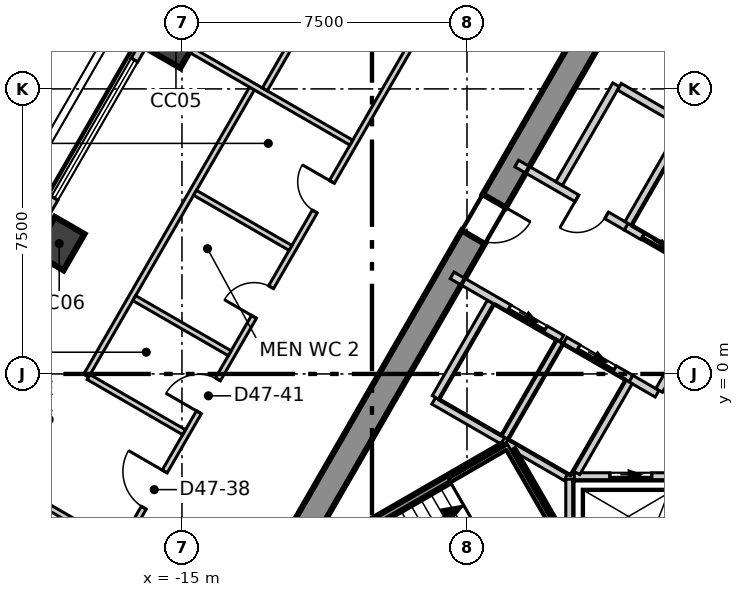
"""IFC4 building model, lengths in metres.
Left out: names, types, materials, properties, quantities, classifications, styles, units other than length and angle.
Written with IfcOpenShell. Run it as: python <this file> out.ifc"""

import sys

from ifc_helpers import new_model, si_unit, direction, frame, frame_2d, origin, origin_2d, place, context, subcontext, project, spatial, polyline, rectangle, outline, extrude, element, fill, save


model = new_model("IFC4")
c1 = context("Model", 3, precision=1e-05, world=origin(), true_north=direction((0.0, 1.0)))
c2 = subcontext(c1, "Body", "Model", "MODEL_VIEW")
j1 = project(units=[si_unit("LENGTHUNIT", "METRE"), si_unit("PLANEANGLEUNIT", "RADIAN")], contexts=[c1])
p1 = place(None, origin())
s1 = spatial("IfcSite", under=j1, at=p1, CompositionType="ELEMENT")
p2 = place(p1, origin())
s2 = spatial("IfcBuilding", under=s1, at=p2, CompositionType="ELEMENT")
p3 = place(p2, frame((0.0, 0.0, 203.3)))
s3 = spatial("IfcBuildingStorey", under=s2, at=p3, CompositionType="ELEMENT", Elevation=203.3)
p4 = place(p3, frame((-1.703, 13.35, -0.3), z_axis=(0.0, 0.0, 1.0), x_axis=(-0.500011533395, -0.866018744874, 0.0)))
e1 = element("IfcWall", 1, at=p4, inside=s3, PredefinedType="SHEAR", context=c2, shape_type="SweptSolid", body=[
    extrude(outline(polyline([(-0.202, -0.35), (1.782, -0.35), (3.766, -0.35), (5.75, -0.35), (7.734, -0.35), (9.718, -0.35), (11.702, -0.35), (13.686, -0.35), (15.67, -0.35), (17.654, -0.35), (19.638, -0.35), (21.622, -0.35), (21.218, 0.35), (19.307, 0.35), (17.397, 0.35), (15.486, 0.35), (13.576, 0.35), (11.665, 0.35), (9.755, 0.35), (7.844, 0.35), (5.934, 0.35), (4.023, 0.35), (2.113, 0.35), (0.202, 0.35), (-0.202, -0.35)])), origin(), (0.0, 0.0, 1.0), 4.0),
])
p5 = place(p4, frame((10.16, 0.0, 0.3)))
e2 = element("IfcOpeningElement", 2, at=p5, cuts=e1, PredefinedType="OPENING", context=c2, shape_type="SweptSolid", body=[
    extrude(rectangle(XDim=1.1, YDim=2.1, at=frame_2d((0.55, 1.05))), frame((0.0, 0.36, 0.0), z_axis=(0.0, -1.0, 0.0), x_axis=(1.0, 0.0, 0.0)), (0.0, 0.0, 1.0), 0.72),
])
p6 = place(p4, frame((4.055, 0.0, 0.3)))
e3 = element("IfcOpeningElement", 3, at=p6, cuts=e1, PredefinedType="OPENING", context=c2, shape_type="SweptSolid", body=[
    extrude(rectangle(XDim=0.9, YDim=2.1, at=frame_2d((0.45, 1.05))), frame((0.0, 0.36, 0.0), z_axis=(0.0, -1.0, 0.0), x_axis=(1.0, 0.0, 0.0)), (0.0, 0.0, 1.0), 0.72),
])
for number, where, z_axis, x_axis in (
    (4, (-15.158, 8.751, -0.3), (0.0, 0.0, 1.0), (0.5, 0.866, 0.0)),
    (5, (-18.23, 3.43, -0.3), (0.0, 0.0, 1.0), (0.5, 0.866, 0.0)),
):
    element("IfcColumn", number, at=place(p3, frame(where, z_axis=z_axis, x_axis=x_axis)), inside=s3, PredefinedType="COLUMN", context=c2, shape_type="SweptSolid", body=[
        extrude(rectangle(XDim=1.1, YDim=0.9, at=origin_2d()), origin(), (0.0, 0.0, 1.0), 4.0),
    ])
p7 = place(p3, frame((-2.824, 31.513, 0.0), z_axis=(0.0, 0.0, 1.0), x_axis=(-0.500012324412, -0.866018288165, 0.0)))
e6 = element("IfcWall", 6, at=p7, inside=s3, PredefinedType="ELEMENTEDWALL", context=c2, shape_type="SweptSolid", body=[
    extrude(rectangle(XDim=51.739, YDim=0.2, at=frame_2d((25.87, 0.0))), origin(), (0.0, 0.0, 1.0), 3.7),
])
p8 = place(p7, frame((2.275, 0.0, 0.9)))
e7 = element("IfcOpeningElement", 7, at=p8, cuts=e6, PredefinedType="OPENING", context=c2, shape_type="SweptSolid", body=[
    extrude(rectangle(XDim=4.2, YDim=2.5, at=frame_2d((2.1, 1.25))), frame((0.0, 0.11, 0.0), z_axis=(0.0, -1.0, 0.0), x_axis=(1.0, 0.0, 0.0)), (0.0, 0.0, 1.0), 0.22),
])
p9 = place(p7, frame((8.419, 0.0, 0.9)))
e8 = element("IfcOpeningElement", 8, at=p9, cuts=e6, PredefinedType="OPENING", context=c2, shape_type="SweptSolid", body=[
    extrude(rectangle(XDim=4.2, YDim=2.5, at=frame_2d((2.1, 1.25))), frame((0.0, 0.11, 0.0), z_axis=(0.0, -1.0, 0.0), x_axis=(1.0, 0.0, 0.0)), (0.0, 0.0, 1.0), 0.22),
])
p10 = place(p7, frame((14.563, 0.0, 0.9)))
e9 = element("IfcOpeningElement", 9, at=p10, cuts=e6, PredefinedType="OPENING", context=c2, shape_type="SweptSolid", body=[
    extrude(rectangle(XDim=4.2, YDim=2.5, at=frame_2d((2.1, 1.25))), frame((0.0, 0.11, 0.0), z_axis=(0.0, -1.0, 0.0), x_axis=(1.0, 0.0, 0.0)), (0.0, 0.0, 1.0), 0.22),
])
p11 = place(p7, frame((20.707, 0.0, 0.9)))
e10 = element("IfcOpeningElement", 10, at=p11, cuts=e6, PredefinedType="OPENING", context=c2, shape_type="SweptSolid", body=[
    extrude(rectangle(XDim=4.2, YDim=2.5, at=frame_2d((2.1, 1.25))), frame((0.0, 0.11, 0.0), z_axis=(0.0, -1.0, 0.0), x_axis=(1.0, 0.0, 0.0)), (0.0, 0.0, 1.0), 0.22),
])
p12 = place(p7, frame((26.851, 0.0, 0.9)))
e11 = element("IfcOpeningElement", 11, at=p12, cuts=e6, PredefinedType="OPENING", context=c2, shape_type="SweptSolid", body=[
    extrude(rectangle(XDim=4.2, YDim=2.5, at=frame_2d((2.1, 1.25))), frame((0.0, 0.11, 0.0), z_axis=(0.0, -1.0, 0.0), x_axis=(1.0, 0.0, 0.0)), (0.0, 0.0, 1.0), 0.22),
])
p13 = place(p7, frame((32.995, 0.0, 0.9)))
e12 = element("IfcOpeningElement", 12, at=p13, cuts=e6, PredefinedType="OPENING", context=c2, shape_type="SweptSolid", body=[
    extrude(rectangle(XDim=4.2, YDim=2.5, at=frame_2d((2.1, 1.25))), frame((0.0, 0.11, 0.0), z_axis=(0.0, -1.0, 0.0), x_axis=(1.0, 0.0, 0.0)), (0.0, 0.0, 1.0), 0.22),
])
p14 = place(p7, frame((39.14, 0.0, 0.9)))
e13 = element("IfcOpeningElement", 13, at=p14, cuts=e6, PredefinedType="OPENING", context=c2, shape_type="SweptSolid", body=[
    extrude(rectangle(XDim=4.2, YDim=2.5, at=frame_2d((2.1, 1.25))), frame((0.0, 0.11, 0.0), z_axis=(0.0, -1.0, 0.0), x_axis=(1.0, 0.0, 0.0)), (0.0, 0.0, 1.0), 0.22),
])
p15 = place(p7, frame((45.284, 0.0, 0.9)))
e14 = element("IfcOpeningElement", 14, at=p15, cuts=e6, PredefinedType="OPENING", context=c2, shape_type="SweptSolid", body=[
    extrude(rectangle(XDim=4.2, YDim=2.5, at=frame_2d((2.1, 1.25))), frame((0.0, 0.11, 0.0), z_axis=(0.0, -1.0, 0.0), x_axis=(1.0, 0.0, 0.0)), (0.0, 0.0, 1.0), 0.22),
])
p16 = place(p3, frame((-21.839, -1.581, 0.0), z_axis=(0.0, 0.0, 1.0), x_axis=(0.866034527326, -0.49998419723, 0.0)))
e15 = element("IfcWall", 15, at=p16, inside=s3, PredefinedType="PARTITIONING", context=c2, shape_type="SweptSolid", body=[
    extrude(rectangle(XDim=5.948, YDim=0.15, at=frame_2d((2.974, 0.0))), origin(), (0.0, 0.0, 1.0), 3.7),
])
p17 = place(p3, frame((-20.883, -11.97, 0.0), z_axis=(0.0, 0.0, 1.0), x_axis=(0.500006150555, 0.866021852731, 0.0)))
e16 = element("IfcWall", 16, at=p17, inside=s3, PredefinedType="PARTITIONING", context=c2, shape_type="SweptSolid", body=[
    extrude(rectangle(XDim=41.766, YDim=0.15, at=frame_2d((20.883, 0.0))), origin(), (0.0, 0.0, 1.0), 3.7),
])
p18 = place(p17, frame((36.916, 0.0, 0.0)))
e17 = element("IfcOpeningElement", 17, at=p18, cuts=e16, PredefinedType="OPENING", context=c2, shape_type="SweptSolid", body=[
    extrude(rectangle(XDim=1.1, YDim=2.1, at=frame_2d((0.55, 1.05))), frame((0.0, 0.085, 0.0), z_axis=(0.0, -1.0, 0.0), x_axis=(1.0, 0.0, 0.0)), (0.0, 0.0, 1.0), 0.17),
])
p19 = place(p17, frame((26.446, 0.0, 0.0)))
e18 = element("IfcOpeningElement", 18, at=p19, cuts=e16, PredefinedType="OPENING", context=c2, shape_type="SweptSolid", body=[
    extrude(rectangle(XDim=1.1, YDim=2.1, at=frame_2d((0.55, 1.05))), frame((0.0, 0.085, 0.0), z_axis=(0.0, -1.0, 0.0), x_axis=(1.0, 0.0, 0.0)), (0.0, 0.0, 1.0), 0.17),
])
p20 = place(p17, frame((9.757, 0.0, 0.0)))
e19 = element("IfcOpeningElement", 19, at=p20, cuts=e16, PredefinedType="OPENING", context=c2, shape_type="SweptSolid", body=[
    extrude(rectangle(XDim=1.1, YDim=2.1, at=frame_2d((0.55, 1.05))), frame((0.0, 0.085, 0.0), z_axis=(0.0, -1.0, 0.0), x_axis=(1.0, 0.0, 0.0)), (0.0, 0.0, 1.0), 0.17),
])
p21 = place(p17, frame((18.757, 0.0, 0.0)))
e20 = element("IfcOpeningElement", 20, at=p21, cuts=e16, PredefinedType="OPENING", context=c2, shape_type="SweptSolid", body=[
    extrude(rectangle(XDim=0.9, YDim=2.1, at=frame_2d((0.45, 1.05))), frame((0.0, 0.085, 0.0), z_axis=(0.0, -1.0, 0.0), x_axis=(1.0, 0.0, 0.0)), (0.0, 0.0, 1.0), 0.17),
])
p22 = place(p17, frame((15.557, 0.0, 0.0)))
e21 = element("IfcOpeningElement", 21, at=p22, cuts=e16, PredefinedType="OPENING", context=c2, shape_type="SweptSolid", body=[
    extrude(rectangle(XDim=0.9, YDim=2.1, at=frame_2d((0.45, 1.05))), frame((0.0, 0.085, 0.0), z_axis=(0.0, -1.0, 0.0), x_axis=(1.0, 0.0, 0.0)), (0.0, 0.0, 1.0), 0.17),
])
p23 = place(p17, frame((12.657, 0.0, 0.0)))
e22 = element("IfcOpeningElement", 22, at=p23, cuts=e16, PredefinedType="OPENING", context=c2, shape_type="SweptSolid", body=[
    extrude(rectangle(XDim=1.0, YDim=2.1, at=frame_2d((0.5, 1.05))), frame((0.0, 0.085, 0.0), z_axis=(0.0, -1.0, 0.0), x_axis=(1.0, 0.0, 0.0)), (0.0, 0.0, 1.0), 0.17),
])
p24 = place(p17, frame((3.669, 0.0, 0.0)))
e23 = element("IfcOpeningElement", 23, at=p24, cuts=e16, PredefinedType="OPENING", context=c2, shape_type="SweptSolid", body=[
    extrude(rectangle(XDim=1.1, YDim=2.1, at=frame_2d((0.55, 1.05))), frame((0.0, 0.085, 0.0), z_axis=(0.0, -1.0, 0.0), x_axis=(1.0, 0.0, 0.0)), (0.0, 0.0, 1.0), 0.17),
])
p25 = place(p3, frame((-17.521, -0.046, 0.0), z_axis=(0.0, 0.0, 1.0), x_axis=(0.499970334739, 0.866042530354, 0.0)))
e24 = element("IfcWall", 24, at=p25, inside=s3, PredefinedType="PARTITIONING", context=c2, shape_type="SweptSolid", body=[
    extrude(rectangle(XDim=8.725, YDim=0.15, at=frame_2d((4.362, 0.0))), origin(), (0.0, 0.0, 1.0), 3.7),
])
p26 = place(p3, frame((-17.456, -0.083, 0.0), z_axis=(0.0, 0.0, 1.0), x_axis=(0.865929066901, -0.500166823267, 0.0)))
e25 = element("IfcWall", 25, at=p26, inside=s3, PredefinedType="PARTITIONING", context=c2, shape_type="SweptSolid", body=[
    extrude(rectangle(XDim=2.901, YDim=0.15, at=frame_2d((1.45, 0.0))), origin(), (0.0, 0.0, 1.0), 3.7),
])
p27 = place(p3, frame((-16.256, 1.995, 0.0), z_axis=(0.0, 0.0, 1.0), x_axis=(0.866059450854, -0.499941024108, 0.0)))
e26 = element("IfcWall", 26, at=p27, inside=s3, PredefinedType="PARTITIONING", context=c2, shape_type="SweptSolid", body=[
    extrude(rectangle(XDim=2.901, YDim=0.15, at=frame_2d((1.45, 0.0))), origin(), (0.0, 0.0, 1.0), 3.7),
])
p28 = place(p3, frame((-15.695, 9.061, 0.0), z_axis=(0.0, 0.0, 1.0), x_axis=(0.866016753976, -0.500014981608, 0.0)))
e27 = element("IfcWall", 27, at=p28, inside=s3, PredefinedType="PARTITIONING", context=c2, shape_type="SweptSolid", body=[
    extrude(rectangle(XDim=5.948, YDim=0.15, at=frame_2d((2.974, 0.0))), origin(), (0.0, 0.0, 1.0), 3.2),
])
p29 = place(p3, frame((-14.656, 4.766, 0.0), z_axis=(0.0, 0.0, 1.0), x_axis=(0.866038412228, -0.499977468037, 0.0)))
e28 = element("IfcWall", 28, at=p29, inside=s3, PredefinedType="PARTITIONING", context=c2, shape_type="SweptSolid", body=[
    extrude(rectangle(XDim=2.901, YDim=0.15, at=frame_2d((1.45, 0.0))), origin(), (0.0, 0.0, 1.0), 3.7),
])
p30 = place(p3, frame((-12.82, 7.488, 0.0), z_axis=(0.0, 0.0, 1.0), x_axis=(0.500060781096, 0.865990308958, 0.0)))
e29 = element("IfcWall", 29, at=p30, inside=s3, PredefinedType="PARTITIONING", context=c2, shape_type="SweptSolid", body=[
    extrude(rectangle(XDim=12.139, YDim=0.15, at=frame_2d((6.069, 0.0))), origin(), (0.0, 0.0, 1.0), 3.7),
])
p31 = place(p30, frame((5.564, 0.0, 0.0)))
e30 = element("IfcOpeningElement", 30, at=p31, cuts=e29, PredefinedType="OPENING", context=c2, shape_type="SweptSolid", body=[
    extrude(rectangle(XDim=1.0, YDim=2.1, at=frame_2d((0.5, 1.05))), frame((0.0, 0.085, 0.0), z_axis=(0.0, -1.0, 0.0), x_axis=(1.0, 0.0, 0.0)), (0.0, 0.0, 1.0), 0.17),
])
p32 = place(p3, frame((-8.376, -0.707, 0.0), z_axis=(0.0, 0.0, 1.0), x_axis=(0.866067520717, -0.499927044236, 0.0)))
e31 = element("IfcWall", 31, at=p32, inside=s3, PredefinedType="SOLIDWALL", context=c2, shape_type="SweptSolid", body=[
    extrude(rectangle(XDim=2.1, YDim=0.2, at=frame_2d((1.05, 0.0))), origin(), (0.0, 0.0, 1.0), 3.7),
])
p33 = place(p3, frame((-8.326, -0.62, 0.0), z_axis=(0.0, 0.0, 1.0), x_axis=(0.500023687443, 0.866011727401, 0.0)))
e32 = element("IfcWall", 32, at=p33, inside=s3, PredefinedType="SOLIDWALL", context=c2, shape_type="SweptSolid", body=[
    extrude(rectangle(XDim=2.9, YDim=0.2, at=frame_2d((1.45, 0.0))), origin(), (0.0, 0.0, 1.0), 3.7),
])
p34 = place(p3, frame((-4.8, -6.9, 0.0), z_axis=(0.0, 0.0, 1.0), x_axis=(0.0, 1.0, 0.0)))
e33 = element("IfcWall", 33, at=p34, inside=s3, PredefinedType="SOLIDWALL", context=c2, shape_type="SweptSolid", body=[
    extrude(rectangle(XDim=4.131, YDim=0.2, at=frame_2d((2.065, 0.0))), origin(), (0.0, 0.0, 1.0), 3.7),
])
p35 = place(p3, frame((-4.676, -2.7, 0.0), z_axis=(0.0, 0.0, 1.0), x_axis=(1.0, 0.0, 0.0)))
e34 = element("IfcWall", 34, at=p35, inside=s3, PredefinedType="SOLIDWALL", context=c2, shape_type="SweptSolid", body=[
    extrude(rectangle(XDim=2.873, YDim=0.2, at=frame_2d((1.437, 0.0))), origin(), (0.0, 0.0, 1.0), 3.7),
])
p36 = place(p35, frame((0.937, 0.0, 0.0)))
e35 = element("IfcOpeningElement", 35, at=p36, cuts=e34, PredefinedType="OPENING", context=c2, shape_type="SweptSolid", body=[
    extrude(rectangle(XDim=1.1, YDim=2.1, at=frame_2d((0.55, 1.05))), frame((0.0, 0.11, 0.0), z_axis=(0.0, -1.0, 0.0), x_axis=(1.0, 0.0, 0.0)), (0.0, 0.0, 1.0), 0.22),
])
p37 = place(p3, frame((-7.891, 2.593, 0.0), z_axis=(0.0, 0.0, 1.0), x_axis=(0.866070917804, -0.499921159118, 0.0)))
e36 = element("IfcWall", 36, at=p37, inside=s3, PredefinedType="SOLIDWALL", context=c2, shape_type="SweptSolid", body=[
    extrude(rectangle(XDim=3.333, YDim=0.2, at=frame_2d((1.666, 0.0))), origin(), (0.0, 0.0, 1.0), 3.7),
])
p38 = place(p37, frame((1.73, 0.0, 0.0)))
e37 = element("IfcOpeningElement", 37, at=p38, cuts=e36, PredefinedType="OPENING", context=c2, shape_type="SweptSolid", body=[
    extrude(rectangle(XDim=1.1, YDim=2.1, at=frame_2d((0.55, 1.05))), frame((0.0, 0.11, 0.0), z_axis=(0.0, -1.0, 0.0), x_axis=(1.0, 0.0, 0.0)), (0.0, 0.0, 1.0), 0.22),
])
p39 = place(p3, frame((-3.188, -0.122, 0.0), z_axis=(0.0, 0.0, 1.0), x_axis=(0.865705793592, -0.50055317294, 0.0)))
e38 = element("IfcWall", 38, at=p39, inside=s3, PredefinedType="SOLIDWALL", context=c2, shape_type="SweptSolid", body=[
    extrude(rectangle(XDim=0.797, YDim=0.2, at=frame_2d((0.398, 0.0))), origin(), (0.0, 0.0, 1.0), 3.7),
])
p40 = place(p3, frame((-6.191, 5.537, 0.0), z_axis=(0.0, 0.0, 1.0), x_axis=(0.866052607023, -0.499952879648, 0.0)))
e39 = element("IfcWall", 39, at=p40, inside=s3, PredefinedType="SOLIDWALL", context=c2, shape_type="SweptSolid", body=[
    extrude(rectangle(XDim=3.332, YDim=0.2, at=frame_2d((1.666, 0.0))), origin(), (0.0, 0.0, 1.0), 3.7),
])
p41 = place(p40, frame((1.83, 0.0, 0.0)))
e40 = element("IfcOpeningElement", 40, at=p41, cuts=e39, PredefinedType="OPENING", context=c2, shape_type="SweptSolid", body=[
    extrude(rectangle(XDim=0.9, YDim=2.1, at=frame_2d((0.45, 1.05))), frame((0.0, 0.11, 0.0), z_axis=(0.0, -1.0, 0.0), x_axis=(1.0, 0.0, 0.0)), (0.0, 0.0, 1.0), 0.22),
])
p42 = place(p3, frame((-5.076, 5.009, 0.0), z_axis=(0.0, 0.0, 1.0), x_axis=(0.50002537861, 0.866010750942, 0.0)))
e41 = element("IfcWall", 41, at=p42, inside=s3, PredefinedType="SOLIDWALL", context=c2, shape_type="SweptSolid", body=[
    extrude(rectangle(XDim=3.0, YDim=0.2, at=frame_2d((1.5, 0.0))), origin(), (0.0, 0.0, 1.0), 3.7),
])
p43 = place(p3, frame((-3.489, 7.557, 0.0), z_axis=(0.0, 0.0, 1.0), x_axis=(0.866010750942, -0.50002537861, 0.0)))
e42 = element("IfcWall", 42, at=p43, inside=s3, PredefinedType="SOLIDWALL", context=c2, shape_type="SweptSolid", body=[
    extrude(rectangle(XDim=2.0, YDim=0.2, at=frame_2d((1.0, 0.0))), origin(), (0.0, 0.0, 1.0), 3.7),
])
p44 = place(p3, frame((-2.444, -0.433, 0.0), z_axis=(0.0, 0.0, 1.0), x_axis=(0.500035624827, 0.866004834804, 0.0)))
e43 = element("IfcWall", 43, at=p44, inside=s3, PredefinedType="SOLIDWALL", context=c2, shape_type="SweptSolid", body=[
    extrude(rectangle(XDim=3.194, YDim=0.2, at=frame_2d((1.597, 0.0))), origin(), (0.0, 0.0, 1.0), 3.7),
])
p45 = place(p3, frame((-6.507, -1.67, 0.0), z_axis=(0.0, 0.0, 1.0), x_axis=(0.50012328804, 0.865954211699, 0.0)))
e44 = element("IfcWall", 44, at=p45, inside=s3, PredefinedType="SOLIDWALL", context=c2, shape_type="SweptSolid", body=[
    extrude(rectangle(XDim=2.9, YDim=0.2, at=frame_2d((1.45, 0.0))), origin(), (0.0, 0.0, 1.0), 3.7),
])
p46 = place(p3, frame((-6.47, -1.807, 0.0), z_axis=(0.0, 0.0, 1.0), x_axis=(0.865883195159, -0.500246231712, 0.0)))
e45 = element("IfcWall", 45, at=p46, inside=s3, PredefinedType="SOLIDWALL", context=c2, shape_type="SweptSolid", body=[
    extrude(rectangle(XDim=1.815, YDim=0.2, at=frame_2d((0.908, 0.0))), origin(), (0.0, 0.0, 1.0), 3.7),
])
p47 = place(p3, frame((-4.922, 0.879, 0.0), z_axis=(0.0, 0.0, 1.0), x_axis=(0.866073918653, -0.499915960366, 0.0)))
e46 = element("IfcWall", 46, at=p47, inside=s3, PredefinedType="SOLIDWALL", context=c2, shape_type="SweptSolid", body=[
    extrude(rectangle(XDim=2.002, YDim=0.2, at=frame_2d((1.001, 0.0))), origin(), (0.0, 0.0, 1.0), 3.7),
])
p48 = place(p47, frame((0.402, 0.0, 0.0)))
e47 = element("IfcOpeningElement", 47, at=p48, cuts=e46, PredefinedType="OPENING", context=c2, shape_type="SweptSolid", body=[
    extrude(rectangle(XDim=1.1, YDim=2.1, at=frame_2d((0.55, 1.05))), frame((0.0, 0.11, 0.0), z_axis=(0.0, -1.0, 0.0), x_axis=(1.0, 0.0, 0.0)), (0.0, 0.0, 1.0), 0.22),
])
p49 = place(p3, frame((-4.619, -2.6, 0.0), z_axis=(0.0, 0.0, 1.0), x_axis=(0.50009492287, 0.865970593103, 0.0)))
e48 = element("IfcWall", 48, at=p49, inside=s3, PredefinedType="SOLIDWALL", context=c2, shape_type="SweptSolid", body=[
    extrude(rectangle(XDim=2.761, YDim=0.2, at=frame_2d((1.381, 0.0))), origin(), (0.0, 0.0, 1.0), 3.7),
])
p50 = place(p3, frame((-3.309, 3.873, 0.0), z_axis=(0.0, 0.0, 1.0), x_axis=(0.866098583652, -0.499873227325, 0.0)))
e49 = element("IfcWall", 49, at=p50, inside=s3, PredefinedType="SOLIDWALL", context=c2, shape_type="SweptSolid", body=[
    extrude(rectangle(XDim=2.103, YDim=0.2, at=frame_2d((1.051, 0.0))), origin(), (0.0, 0.0, 1.0), 3.7),
])
p51 = place(p50, frame((0.502, 0.0, 0.0)))
e50 = element("IfcOpeningElement", 50, at=p51, cuts=e49, PredefinedType="OPENING", context=c2, shape_type="SweptSolid", body=[
    extrude(rectangle(XDim=1.1, YDim=2.1, at=frame_2d((0.55, 1.05))), frame((0.0, 0.11, 0.0), z_axis=(0.0, -1.0, 0.0), x_axis=(1.0, 0.0, 0.0)), (0.0, 0.0, 1.0), 0.22),
])
p52 = place(p3, frame((-3.257, 3.959, 0.0), z_axis=(0.0, 0.0, 1.0), x_axis=(0.50012328804, 0.865954211699, 0.0)))
e51 = element("IfcWall", 51, at=p52, inside=s3, PredefinedType="SOLIDWALL", context=c2, shape_type="SweptSolid", body=[
    extrude(rectangle(XDim=2.9, YDim=0.2, at=frame_2d((1.45, 0.0))), origin(), (0.0, 0.0, 1.0), 3.7),
])
p53 = place(p3, frame((-12.344, -5.279, 0.0), z_axis=(0.0, 0.0, 1.0), x_axis=(0.866046323291, 0.499963764601, 0.0)))
e52 = element("IfcWall", 52, at=p53, inside=s3, PredefinedType="SOLIDWALL", context=c2, shape_type="SweptSolid", body=[
    extrude(rectangle(XDim=6.714, YDim=0.2, at=frame_2d((3.357, 0.0))), origin(), (0.0, 0.0, 1.0), 3.7),
])
p54 = place(p3, frame((-6.329, -2.038, 0.0), z_axis=(0.0, 0.0, 1.0), x_axis=(0.500200581029, -0.865909567298, 0.0)))
e53 = element("IfcWall", 53, at=p54, inside=s3, PredefinedType="SOLIDWALL", context=c2, shape_type="SweptSolid", body=[
    extrude(rectangle(XDim=2.799, YDim=0.2, at=frame_2d((1.399, 0.0))), origin(), (0.0, 0.0, 1.0), 3.7),
])
p55 = place(p12, origin())
e54 = element("IfcWindow", 54, at=p55, inside=s3, PartitioningType="SINGLE_PANEL", PredefinedType="WINDOW", context=c2, shape_type="SweptSolid", body=[
    extrude(rectangle(XDim=4.2, YDim=2.5, at=frame_2d((2.1, 1.25))), frame((0.0, 0.03, 0.0), z_axis=(0.0, -1.0, 0.0), x_axis=(1.0, 0.0, 0.0)), (0.0, 0.0, 1.0), 0.06),
])
fill(e11, e54)
p56 = place(p36, origin())
e55 = element("IfcDoor", 55, at=p56, inside=s3, OperationType="SLIDING_TO_LEFT", PredefinedType="DOOR", context=c2, shape_type="SweptSolid", body=[
    extrude(rectangle(XDim=1.1, YDim=2.1, at=frame_2d((0.55, 1.05))), frame((0.0, 0.025, 0.0), z_axis=(0.0, -1.0, 0.0), x_axis=(1.0, 0.0, 0.0)), (0.0, 0.0, 1.0), 0.05),
])
fill(e35, e55)
p57 = place(p48, origin())
e56 = element("IfcDoor", 56, at=p57, inside=s3, OperationType="SLIDING_TO_LEFT", PredefinedType="DOOR", context=c2, shape_type="SweptSolid", body=[
    extrude(rectangle(XDim=1.1, YDim=2.1, at=frame_2d((0.55, 1.05))), frame((0.0, 0.025, 0.0), z_axis=(0.0, -1.0, 0.0), x_axis=(1.0, 0.0, 0.0)), (0.0, 0.0, 1.0), 0.05),
])
fill(e47, e56)
p58 = place(p51, origin())
e57 = element("IfcDoor", 57, at=p58, inside=s3, OperationType="SLIDING_TO_LEFT", PredefinedType="DOOR", context=c2, shape_type="SweptSolid", body=[
    extrude(rectangle(XDim=1.1, YDim=2.1, at=frame_2d((0.55, 1.05))), frame((0.0, 0.025, 0.0), z_axis=(0.0, -1.0, 0.0), x_axis=(1.0, 0.0, 0.0)), (0.0, 0.0, 1.0), 0.05),
])
fill(e50, e57)
p59 = place(p38, origin())
e58 = element("IfcDoor", 58, at=p59, inside=s3, OperationType="SLIDING_TO_LEFT", PredefinedType="DOOR", context=c2, shape_type="SweptSolid", body=[
    extrude(rectangle(XDim=1.1, YDim=2.1, at=frame_2d((0.55, 1.05))), frame((0.0, 0.025, 0.0), z_axis=(0.0, -1.0, 0.0), x_axis=(1.0, 0.0, 0.0)), (0.0, 0.0, 1.0), 0.05),
])
fill(e37, e58)
p60 = place(p41, origin())
e59 = element("IfcDoor", 59, at=p60, inside=s3, OperationType="SINGLE_SWING_LEFT", PredefinedType="DOOR", context=c2, shape_type="SweptSolid", body=[
    extrude(rectangle(XDim=0.9, YDim=2.1, at=frame_2d((0.45, 1.05))), frame((0.0, 0.025, 0.0), z_axis=(0.0, -1.0, 0.0), x_axis=(1.0, 0.0, 0.0)), (0.0, 0.0, 1.0), 0.05),
])
fill(e40, e59)
p61 = place(p20, origin())
e60 = element("IfcDoor", 60, at=p61, inside=s3, OperationType="SINGLE_SWING_LEFT", PredefinedType="DOOR", context=c2, shape_type="SweptSolid", body=[
    extrude(rectangle(XDim=1.1, YDim=2.1, at=frame_2d((0.55, 1.05))), frame((0.0, 0.025, 0.0), z_axis=(0.0, -1.0, 0.0), x_axis=(1.0, 0.0, 0.0)), (0.0, 0.0, 1.0), 0.05),
])
fill(e19, e60)
p62 = place(p21, origin())
e61 = element("IfcDoor", 61, at=p62, inside=s3, OperationType="SINGLE_SWING_LEFT", PredefinedType="DOOR", context=c2, shape_type="SweptSolid", body=[
    extrude(rectangle(XDim=0.9, YDim=2.1, at=frame_2d((0.45, 1.05))), frame((0.0, 0.025, 0.0), z_axis=(0.0, -1.0, 0.0), x_axis=(1.0, 0.0, 0.0)), (0.0, 0.0, 1.0), 0.05),
])
fill(e20, e61)
p63 = place(p22, origin())
e62 = element("IfcDoor", 62, at=p63, inside=s3, OperationType="SINGLE_SWING_RIGHT", PredefinedType="DOOR", context=c2, shape_type="SweptSolid", body=[
    extrude(rectangle(XDim=0.9, YDim=2.1, at=frame_2d((0.45, 1.05))), frame((0.0, 0.025, 0.0), z_axis=(0.0, -1.0, 0.0), x_axis=(1.0, 0.0, 0.0)), (0.0, 0.0, 1.0), 0.05),
])
fill(e21, e62)
p64 = place(p23, origin())
e63 = element("IfcDoor", 63, at=p64, inside=s3, OperationType="SINGLE_SWING_RIGHT", PredefinedType="DOOR", context=c2, shape_type="SweptSolid", body=[
    extrude(rectangle(XDim=1.0, YDim=2.1, at=frame_2d((0.5, 1.05))), frame((0.0, 0.025, 0.0), z_axis=(0.0, -1.0, 0.0), x_axis=(1.0, 0.0, 0.0)), (0.0, 0.0, 1.0), 0.05),
])
fill(e22, e63)
p65 = place(p5, origin())
e64 = element("IfcDoor", 64, at=p65, inside=s3, OperationType="SINGLE_SWING_RIGHT", PredefinedType="DOOR", context=c2, shape_type="SweptSolid", body=[
    extrude(rectangle(XDim=1.1, YDim=2.1, at=frame_2d((0.55, 1.05))), frame((0.0, 0.025, 0.0), z_axis=(0.0, -1.0, 0.0), x_axis=(1.0, 0.0, 0.0)), (0.0, 0.0, 1.0), 0.05),
])
fill(e2, e64)
save(model, sys.argv[1])
